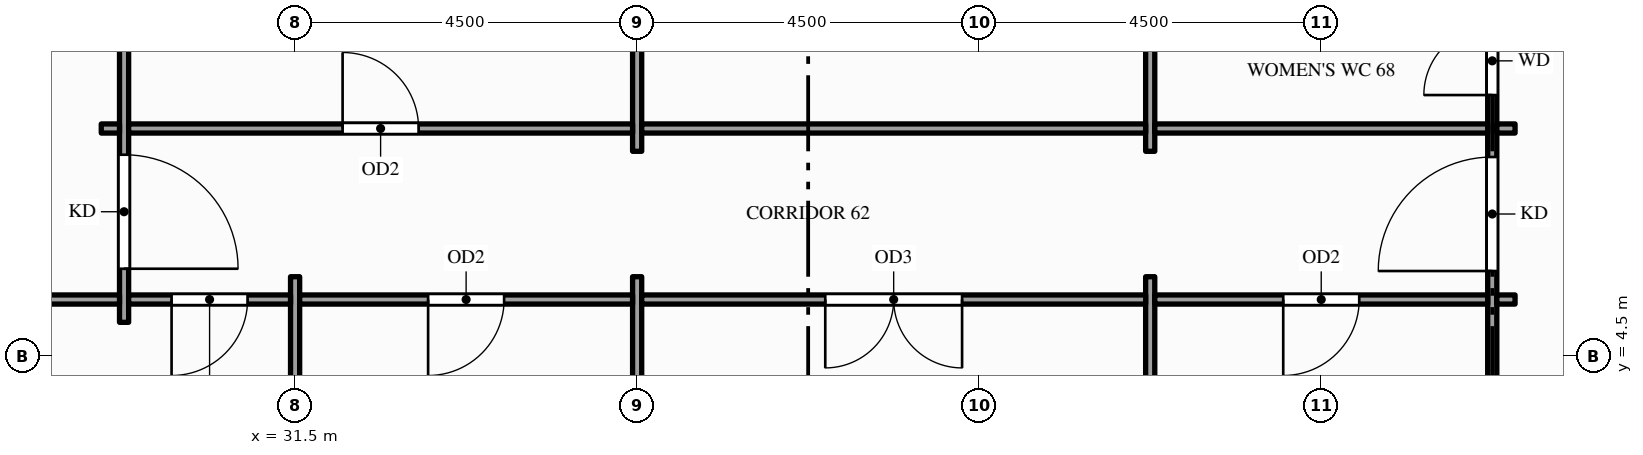
"""IFC4 building model, lengths in metres.
Left out: names, types, materials, properties, quantities, classifications, styles, units other than length and angle.
Written with IfcOpenShell. Run it as: python <this file> out.ifc"""

import sys

from ifc_helpers import new_model, si_unit, direction, frame, frame_2d, origin, place, context, subcontext, project, spatial, rectangle, extrude, element, fill, save


model = new_model("IFC4")
c1 = context("Model", 3, precision=1e-05, world=origin(), true_north=direction((0.0, 1.0)))
c2 = subcontext(c1, "Body", "Model", "MODEL_VIEW")
j1 = project(units=[si_unit("LENGTHUNIT", "METRE"), si_unit("PLANEANGLEUNIT", "RADIAN")], contexts=[c1])
p1 = place(None, origin())
s1 = spatial("IfcSite", under=j1, at=p1, CompositionType="ELEMENT")
p2 = place(p1, origin())
s2 = spatial("IfcBuilding", under=s1, at=p2, CompositionType="ELEMENT")
p3 = place(p2, frame((0.0, 0.0, 207.0)))
s3 = spatial("IfcBuildingStorey", under=s2, at=p3, CompositionType="ELEMENT", Elevation=207.0)
p4 = place(p3, frame((29.25, 4.95, 0.0), z_axis=(0.0, 0.0, 1.0), x_axis=(0.0, 1.0, 0.0)))
e1 = element("IfcWall", 1, at=p4, inside=s3, PredefinedType="PARTITIONING", context=c2, shape_type="SweptSolid", body=[
    extrude(rectangle(XDim=9.6, YDim=0.12, at=frame_2d((4.8, 0.0))), origin(), (0.0, 0.0, 1.0), 2.87),
])
p5 = place(p4, frame((0.705, 0.0, 0.0)))
e2 = element("IfcOpeningElement", 2, at=p5, cuts=e1, PredefinedType="OPENING", context=c2, shape_type="SweptSolid", body=[
    extrude(rectangle(XDim=1.5, YDim=2.1, at=frame_2d((0.75, 1.05))), frame((0.0, 0.07, 0.0), z_axis=(0.0, -1.0, 0.0), x_axis=(1.0, 0.0, 0.0)), (0.0, 0.0, 1.0), 0.14),
])
p6 = place(p4, frame((7.395, 0.0, 0.0)))
e3 = element("IfcOpeningElement", 3, at=p6, cuts=e1, PredefinedType="OPENING", context=c2, shape_type="SweptSolid", body=[
    extrude(rectangle(XDim=1.5, YDim=2.1, at=frame_2d((0.75, 1.05))), frame((0.0, 0.07, 0.0), z_axis=(0.0, -1.0, 0.0), x_axis=(1.0, 0.0, 0.0)), (0.0, 0.0, 1.0), 0.14),
])
for number, where, z_axis, x_axis in (
    (4, (31.5, -1.35, 0.0), (0.0, 0.0, 1.0), (0.0, 1.0, 0.0)),
    (5, (36.0, -1.35, 0.0), (0.0, 0.0, 1.0), (0.0, 1.0, 0.0)),
):
    element("IfcWall", number, at=place(p3, frame(where, z_axis=z_axis, x_axis=x_axis)), inside=s3, PredefinedType="PARTITIONING", context=c2, shape_type="SweptSolid", body=[
        extrude(rectangle(XDim=6.9, YDim=0.12, at=frame_2d((3.45, 0.0))), origin(), (0.0, 0.0, 1.0), 2.87),
    ])
p7 = place(p3, frame((36.0, 7.2, 0.0), z_axis=(0.0, 0.0, 1.0), x_axis=(0.0, 1.0, 0.0)))
e6 = element("IfcWall", 6, at=p7, inside=s3, PredefinedType="PARTITIONING", context=c2, shape_type="SweptSolid", body=[
    extrude(rectangle(XDim=5.1, YDim=0.12, at=frame_2d((2.55, 0.0))), origin(), (0.0, 0.0, 1.0), 2.87),
])
p8 = place(p3, frame((42.75, -1.35, 0.0), z_axis=(0.0, 0.0, 1.0), x_axis=(0.0, 1.0, 0.0)))
e7 = element("IfcWall", 7, at=p8, inside=s3, PredefinedType="PARTITIONING", context=c2, shape_type="SweptSolid", body=[
    extrude(rectangle(XDim=6.9, YDim=0.12, at=frame_2d((3.45, 0.0))), origin(), (0.0, 0.0, 1.0), 2.87),
])
p9 = place(p3, frame((42.75, 7.2, 0.0), z_axis=(0.0, 0.0, 1.0), x_axis=(0.0, 1.0, 0.0)))
e8 = element("IfcWall", 8, at=p9, inside=s3, PredefinedType="PARTITIONING", context=c2, shape_type="SweptSolid", body=[
    extrude(rectangle(XDim=5.1, YDim=0.12, at=frame_2d((2.55, 0.0))), origin(), (0.0, 0.0, 1.0), 2.87),
])
p10 = place(p3, frame((47.25, -1.35, 0.0), z_axis=(0.0, 0.0, 1.0), x_axis=(0.0, 1.0, 0.0)))
e9 = element("IfcWall", 9, at=p10, inside=s3, PredefinedType="PARTITIONING", context=c2, shape_type="SweptSolid", body=[
    extrude(rectangle(XDim=22.2, YDim=0.12, at=frame_2d((11.1, 0.0))), origin(), (0.0, 0.0, 1.0), 2.87),
])
p11 = place(p10, frame((6.975, 0.0, 0.0)))
e10 = element("IfcOpeningElement", 10, at=p11, cuts=e9, PredefinedType="OPENING", context=c2, shape_type="SweptSolid", body=[
    extrude(rectangle(XDim=1.5, YDim=2.1, at=frame_2d((0.75, 1.05))), frame((0.0, 0.07, 0.0), z_axis=(0.0, -1.0, 0.0), x_axis=(1.0, 0.0, 0.0)), (0.0, 0.0, 1.0), 0.14),
])
p12 = place(p10, frame((13.725, 0.0, 0.0)))
e11 = element("IfcOpeningElement", 11, at=p12, cuts=e9, PredefinedType="OPENING", context=c2, shape_type="SweptSolid", body=[
    extrude(rectangle(XDim=1.5, YDim=2.1, at=frame_2d((0.75, 1.05))), frame((0.0, 0.07, 0.0), z_axis=(0.0, -1.0, 0.0), x_axis=(1.0, 0.0, 0.0)), (0.0, 0.0, 1.0), 0.14),
])
p13 = place(p10, frame((9.29, 0.0, 0.0)))
e12 = element("IfcOpeningElement", 12, at=p13, cuts=e9, PredefinedType="OPENING", context=c2, shape_type="SweptSolid", body=[
    extrude(rectangle(XDim=0.9, YDim=2.1, at=frame_2d((0.45, 1.05))), frame((0.0, 0.07, 0.0), z_axis=(0.0, -1.0, 0.0), x_axis=(1.0, 0.0, 0.0)), (0.0, 0.0, 1.0), 0.14),
])
p14 = place(p10, frame((10.65, 0.0, 0.0)))
e13 = element("IfcOpeningElement", 13, at=p14, cuts=e9, PredefinedType="OPENING", context=c2, shape_type="SweptSolid", body=[
    extrude(rectangle(XDim=0.9, YDim=2.1, at=frame_2d((0.45, 1.05))), frame((0.0, 0.07, 0.0), z_axis=(0.0, -1.0, 0.0), x_axis=(1.0, 0.0, 0.0)), (0.0, 0.0, 1.0), 0.14),
])
p15 = place(p10, frame((12.01, 0.0, 0.0)))
e14 = element("IfcOpeningElement", 14, at=p15, cuts=e9, PredefinedType="OPENING", context=c2, shape_type="SweptSolid", body=[
    extrude(rectangle(XDim=1.0, YDim=2.1, at=frame_2d((0.5, 1.05))), frame((0.0, 0.07, 0.0), z_axis=(0.0, -1.0, 0.0), x_axis=(1.0, 0.0, 0.0)), (0.0, 0.0, 1.0), 0.14),
])
p16 = place(p3, frame((27.06, 5.25, 0.0), z_axis=(0.0, 0.0, 1.0), x_axis=(1.0, 0.0, 0.0)))
e15 = element("IfcWall", 15, at=p16, inside=s3, PredefinedType="PARTITIONING", context=c2, shape_type="SweptSolid", body=[
    extrude(rectangle(XDim=2.13, YDim=0.12, at=frame_2d((1.065, 0.0))), origin(), (0.0, 0.0, 1.0), 2.87),
])
p17 = place(p3, frame((29.31, 5.25, 0.0), z_axis=(0.0, 0.0, 1.0), x_axis=(1.0, 0.0, 0.0)))
e16 = element("IfcWall", 16, at=p17, inside=s3, PredefinedType="PARTITIONING", context=c2, shape_type="SweptSolid", body=[
    extrude(rectangle(XDim=2.13, YDim=0.12, at=frame_2d((1.065, 0.0))), origin(), (0.0, 0.0, 1.0), 2.87),
])
p18 = place(p17, frame((0.565, 0.0, 0.0)))
e17 = element("IfcOpeningElement", 17, at=p18, cuts=e16, PredefinedType="OPENING", context=c2, shape_type="SweptSolid", body=[
    extrude(rectangle(XDim=1.0, YDim=2.1, at=frame_2d((0.5, 1.05))), frame((0.0, 0.07, 0.0), z_axis=(0.0, -1.0, 0.0), x_axis=(1.0, 0.0, 0.0)), (0.0, 0.0, 1.0), 0.14),
])
p19 = place(p3, frame((31.56, 5.25, 0.0), z_axis=(0.0, 0.0, 1.0), x_axis=(1.0, 0.0, 0.0)))
e18 = element("IfcWall", 18, at=p19, inside=s3, PredefinedType="PARTITIONING", context=c2, shape_type="SweptSolid", body=[
    extrude(rectangle(XDim=4.38, YDim=0.12, at=frame_2d((2.19, 0.0))), origin(), (0.0, 0.0, 1.0), 2.87),
])
p20 = place(p19, frame((1.69, 0.0, 0.0)))
e19 = element("IfcOpeningElement", 19, at=p20, cuts=e18, PredefinedType="OPENING", context=c2, shape_type="SweptSolid", body=[
    extrude(rectangle(XDim=1.0, YDim=2.1, at=frame_2d((0.5, 1.05))), frame((0.0, 0.07, 0.0), z_axis=(0.0, -1.0, 0.0), x_axis=(1.0, 0.0, 0.0)), (0.0, 0.0, 1.0), 0.14),
])
p21 = place(p3, frame((36.06, 5.25, 0.0), z_axis=(0.0, 0.0, 1.0), x_axis=(1.0, 0.0, 0.0)))
e20 = element("IfcWall", 20, at=p21, inside=s3, PredefinedType="PARTITIONING", context=c2, shape_type="SweptSolid", body=[
    extrude(rectangle(XDim=6.63, YDim=0.12, at=frame_2d((3.315, 0.0))), origin(), (0.0, 0.0, 1.0), 2.87),
])
p22 = place(p21, frame((2.415, 0.0, 0.0)))
e21 = element("IfcOpeningElement", 21, at=p22, cuts=e20, PredefinedType="OPENING", context=c2, shape_type="SweptSolid", body=[
    extrude(rectangle(XDim=1.8, YDim=2.1, at=frame_2d((0.9, 1.05))), frame((0.0, 0.07, 0.0), z_axis=(0.0, -1.0, 0.0), x_axis=(1.0, 0.0, 0.0)), (0.0, 0.0, 1.0), 0.14),
])
p23 = place(p3, frame((42.81, 5.25, 0.0), z_axis=(0.0, 0.0, 1.0), x_axis=(1.0, 0.0, 0.0)))
e22 = element("IfcWall", 22, at=p23, inside=s3, PredefinedType="PARTITIONING", context=c2, shape_type="SweptSolid", body=[
    extrude(rectangle(XDim=4.38, YDim=0.12, at=frame_2d((2.19, 0.0))), origin(), (0.0, 0.0, 1.0), 2.87),
])
p24 = place(p23, frame((1.69, 0.0, 0.0)))
e23 = element("IfcOpeningElement", 23, at=p24, cuts=e22, PredefinedType="OPENING", context=c2, shape_type="SweptSolid", body=[
    extrude(rectangle(XDim=1.0, YDim=2.1, at=frame_2d((0.5, 1.05))), frame((0.0, 0.07, 0.0), z_axis=(0.0, -1.0, 0.0), x_axis=(1.0, 0.0, 0.0)), (0.0, 0.0, 1.0), 0.14),
])
for number, where, z_axis, x_axis in (
    (24, (47.31, 5.25, 0.0), (0.0, 0.0, 1.0), (1.0, 0.0, 0.0)),
    (25, (28.95, 7.5, 0.0), (0.0, 0.0, 1.0), (1.0, 0.0, 0.0)),
):
    element("IfcWall", number, at=place(p3, frame(where, z_axis=z_axis, x_axis=x_axis)), inside=s3, PredefinedType="PARTITIONING", context=c2, shape_type="SweptSolid", body=[
        extrude(rectangle(XDim=0.24, YDim=0.12, at=frame_2d((0.12, 0.0))), origin(), (0.0, 0.0, 1.0), 2.87),
    ])
p25 = place(p3, frame((29.31, 7.5, 0.0), z_axis=(0.0, 0.0, 1.0), x_axis=(1.0, 0.0, 0.0)))
e26 = element("IfcWall", 26, at=p25, inside=s3, PredefinedType="PARTITIONING", context=c2, shape_type="SweptSolid", body=[
    extrude(rectangle(XDim=6.63, YDim=0.12, at=frame_2d((3.315, 0.0))), origin(), (0.0, 0.0, 1.0), 2.87),
])
p26 = place(p25, frame((2.815, 0.0, 0.0)))
e27 = element("IfcOpeningElement", 27, at=p26, cuts=e26, PredefinedType="OPENING", context=c2, shape_type="SweptSolid", body=[
    extrude(rectangle(XDim=1.0, YDim=2.1, at=frame_2d((0.5, 1.05))), frame((0.0, 0.07, 0.0), z_axis=(0.0, -1.0, 0.0), x_axis=(1.0, 0.0, 0.0)), (0.0, 0.0, 1.0), 0.14),
])
p27 = place(p3, frame((36.06, 7.5, 0.0), z_axis=(0.0, 0.0, 1.0), x_axis=(1.0, 0.0, 0.0)))
e28 = element("IfcWall", 28, at=p27, inside=s3, PredefinedType="PARTITIONING", context=c2, shape_type="SweptSolid", body=[
    extrude(rectangle(XDim=6.63, YDim=0.12, at=frame_2d((3.315, 0.0))), origin(), (0.0, 0.0, 1.0), 2.87),
])
p28 = place(p3, frame((42.81, 7.5, 0.0), z_axis=(0.0, 0.0, 1.0), x_axis=(1.0, 0.0, 0.0)))
e29 = element("IfcWall", 29, at=p28, inside=s3, PredefinedType="PARTITIONING", context=c2, shape_type="SweptSolid", body=[
    extrude(rectangle(XDim=4.38, YDim=0.12, at=frame_2d((2.19, 0.0))), origin(), (0.0, 0.0, 1.0), 2.87),
])
p29 = place(p3, frame((47.31, 7.5, 0.0), z_axis=(0.0, 0.0, 1.0), x_axis=(1.0, 0.0, 0.0)))
e30 = element("IfcWall", 30, at=p29, inside=s3, PredefinedType="PARTITIONING", context=c2, shape_type="SweptSolid", body=[
    extrude(rectangle(XDim=0.24, YDim=0.12, at=frame_2d((0.12, 0.0))), origin(), (0.0, 0.0, 1.0), 2.87),
])
p30 = place(p5, origin())
e31 = element("IfcDoor", 31, at=p30, inside=s3, OperationType="SINGLE_SWING_LEFT", PredefinedType="DOOR", context=c2, shape_type="SweptSolid", body=[
    extrude(rectangle(XDim=1.5, YDim=2.1, at=frame_2d((0.75, 1.05))), frame((0.0, 0.025, 0.0), z_axis=(0.0, -1.0, 0.0), x_axis=(1.0, 0.0, 0.0)), (0.0, 0.0, 1.0), 0.05),
])
fill(e2, e31)
p31 = place(p11, origin())
e32 = element("IfcDoor", 32, at=p31, inside=s3, OperationType="SINGLE_SWING_LEFT", PredefinedType="DOOR", context=c2, shape_type="SweptSolid", body=[
    extrude(rectangle(XDim=1.5, YDim=2.1, at=frame_2d((0.75, 1.05))), frame((0.0, 0.025, 0.0), z_axis=(0.0, -1.0, 0.0), x_axis=(1.0, 0.0, 0.0)), (0.0, 0.0, 1.0), 0.05),
])
fill(e10, e32)
p32 = place(p26, origin())
e33 = element("IfcDoor", 33, at=p32, inside=s3, OperationType="SINGLE_SWING_LEFT", PredefinedType="DOOR", context=c2, shape_type="SweptSolid", body=[
    extrude(rectangle(XDim=1.0, YDim=2.1, at=frame_2d((0.5, 1.05))), frame((0.0, 0.025, 0.0), z_axis=(0.0, -1.0, 0.0), x_axis=(1.0, 0.0, 0.0)), (0.0, 0.0, 1.0), 0.05),
])
fill(e27, e33)
p33 = place(p13, origin())
e34 = element("IfcDoor", 34, at=p33, inside=s3, OperationType="SINGLE_SWING_LEFT", PredefinedType="DOOR", context=c2, shape_type="SweptSolid", body=[
    extrude(rectangle(XDim=0.9, YDim=2.1, at=frame_2d((0.45, 1.05))), frame((0.0, 0.025, 0.0), z_axis=(0.0, -1.0, 0.0), x_axis=(1.0, 0.0, 0.0)), (0.0, 0.0, 1.0), 0.05),
])
fill(e12, e34)
p34 = place(p18, origin())
e35 = element("IfcDoor", 35, at=p34, inside=s3, OperationType="SINGLE_SWING_LEFT", PredefinedType="DOOR", context=c2, shape_type="SweptSolid", body=[
    extrude(rectangle(XDim=1.0, YDim=2.1, at=frame_2d((0.5, 1.05))), frame((0.0, 0.025, 0.0), z_axis=(0.0, -1.0, 0.0), x_axis=(1.0, 0.0, 0.0)), (0.0, 0.0, 1.0), 0.05),
])
fill(e17, e35)
p35 = place(p20, origin())
e36 = element("IfcDoor", 36, at=p35, inside=s3, OperationType="SINGLE_SWING_LEFT", PredefinedType="DOOR", context=c2, shape_type="SweptSolid", body=[
    extrude(rectangle(XDim=1.0, YDim=2.1, at=frame_2d((0.5, 1.05))), frame((0.0, 0.025, 0.0), z_axis=(0.0, -1.0, 0.0), x_axis=(1.0, 0.0, 0.0)), (0.0, 0.0, 1.0), 0.05),
])
fill(e19, e36)
p36 = place(p22, origin())
e37 = element("IfcDoor", 37, at=p36, inside=s3, OperationType="DOUBLE_DOOR_SINGLE_SWING", PredefinedType="DOOR", context=c2, shape_type="SweptSolid", body=[
    extrude(rectangle(XDim=1.8, YDim=2.1, at=frame_2d((0.9, 1.05))), frame((0.0, 0.025, 0.0), z_axis=(0.0, -1.0, 0.0), x_axis=(1.0, 0.0, 0.0)), (0.0, 0.0, 1.0), 0.05),
])
fill(e21, e37)
p37 = place(p24, origin())
e38 = element("IfcDoor", 38, at=p37, inside=s3, OperationType="SINGLE_SWING_LEFT", PredefinedType="DOOR", context=c2, shape_type="SweptSolid", body=[
    extrude(rectangle(XDim=1.0, YDim=2.1, at=frame_2d((0.5, 1.05))), frame((0.0, 0.025, 0.0), z_axis=(0.0, -1.0, 0.0), x_axis=(1.0, 0.0, 0.0)), (0.0, 0.0, 1.0), 0.05),
])
fill(e23, e38)
save(model, sys.argv[1])
